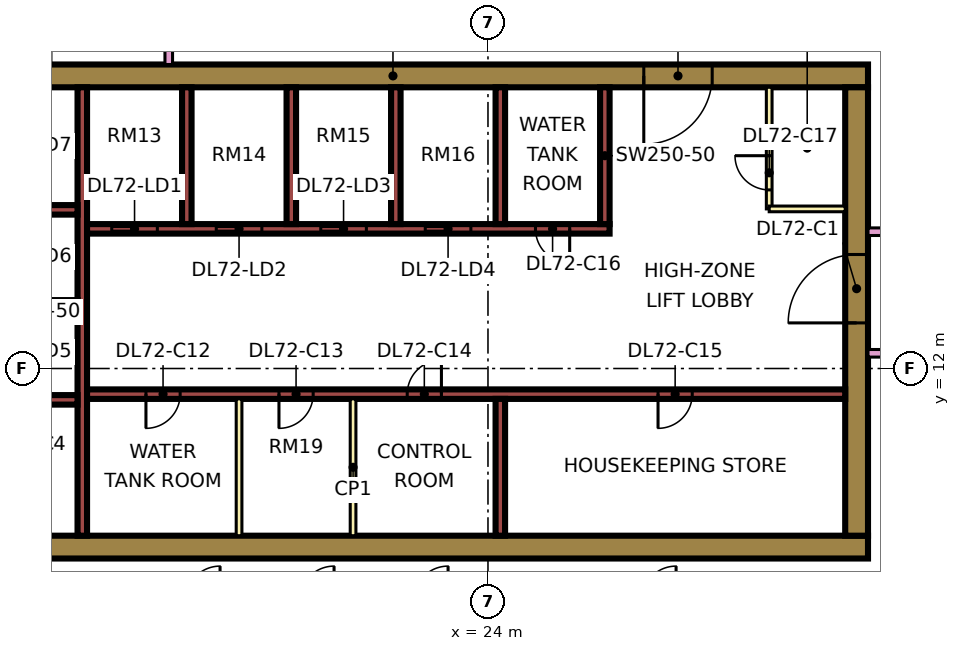
"""IFC4 building model, lengths in metres.
Left out: names, types, materials, properties, quantities, classifications, styles, units other than length and angle.
Written with IfcOpenShell. Run it as: python <this file> out.ifc"""

import sys

from ifc_helpers import new_model, si_unit, direction, frame, frame_2d, origin, place, context, subcontext, project, spatial, rectangle, extrude, element, fill, save


model = new_model("IFC4")
c1 = context("Model", 3, precision=1e-05, world=origin(), true_north=direction((0.0, 1.0)))
c2 = subcontext(c1, "Body", "Model", "MODEL_VIEW")
j1 = project(units=[si_unit("LENGTHUNIT", "METRE"), si_unit("PLANEANGLEUNIT", "RADIAN")], contexts=[c1])
p1 = place(None, origin())
s1 = spatial("IfcSite", under=j1, at=p1, CompositionType="ELEMENT")
p2 = place(p1, origin())
s2 = spatial("IfcBuilding", under=s1, at=p2, CompositionType="ELEMENT")
p3 = place(p2, frame((0.0, 0.0, 307.15)))
s3 = spatial("IfcBuildingStorey", under=s2, at=p3, CompositionType="ELEMENT", Elevation=307.15)
p4 = place(p3, frame((9.0, 7.3, 0.0), z_axis=(0.0, 0.0, 1.0), x_axis=(1.0, 0.0, 0.0)))
e1 = element("IfcWall", 1, at=p4, inside=s3, PredefinedType="SHEAR", context=c2, shape_type="SweptSolid", body=[
    extrude(rectangle(XDim=25.0, YDim=0.6, at=frame_2d((12.5, 0.0))), origin(), (0.0, 0.0, 1.0), 3.75),
])
p5 = place(p3, frame((9.0, 19.7, 0.0), z_axis=(0.0, 0.0, 1.0), x_axis=(1.0, 0.0, 0.0)))
e2 = element("IfcWall", 2, at=p5, inside=s3, PredefinedType="SHEAR", context=c2, shape_type="SweptSolid", body=[
    extrude(rectangle(XDim=25.0, YDim=0.6, at=frame_2d((12.5, 0.0))), origin(), (0.0, 0.0, 1.0), 3.75),
])
p6 = place(p5, frame((19.1, 0.0, 0.0)))
e3 = element("IfcOpeningElement", 3, at=p6, cuts=e2, PredefinedType="OPENING", context=c2, shape_type="SweptSolid", body=[
    extrude(rectangle(XDim=1.8, YDim=2.4, at=frame_2d((0.9, 1.2))), frame((0.0, 0.31, 0.0), z_axis=(0.0, -1.0, 0.0), x_axis=(1.0, 0.0, 0.0)), (0.0, 0.0, 1.0), 0.62),
])
p7 = place(p3, frame((33.7, 7.6, 0.0), z_axis=(0.0, 0.0, 1.0), x_axis=(0.0, 1.0, 0.0)))
e4 = element("IfcWall", 4, at=p7, inside=s3, PredefinedType="SHEAR", context=c2, shape_type="SweptSolid", body=[
    extrude(rectangle(XDim=11.8, YDim=0.6, at=frame_2d((5.9, 0.0))), origin(), (0.0, 0.0, 1.0), 3.75),
])
p8 = place(p7, frame((5.6, 0.0, 0.0)))
e5 = element("IfcOpeningElement", 5, at=p8, cuts=e4, PredefinedType="OPENING", context=c2, shape_type="SweptSolid", body=[
    extrude(rectangle(XDim=1.8, YDim=2.4, at=frame_2d((0.9, 1.2))), frame((0.0, 0.31, 0.0), z_axis=(0.0, -1.0, 0.0), x_axis=(1.0, 0.0, 0.0)), (0.0, 0.0, 1.0), 0.62),
])
p9 = place(p3, frame((13.325, 7.6, 0.0), z_axis=(0.0, 0.0, 1.0), x_axis=(0.0, 1.0, 0.0)))
e6 = element("IfcWall", 6, at=p9, inside=s3, PredefinedType="SHEAR", context=c2, shape_type="SweptSolid", body=[
    extrude(rectangle(XDim=11.8, YDim=0.25, at=frame_2d((5.9, 0.0))), origin(), (0.0, 0.0, 1.0), 3.75),
])
p10 = place(p3, frame((13.45, 11.325, 0.0), z_axis=(0.0, 0.0, 1.0), x_axis=(1.0, 0.0, 0.0)))
e7 = element("IfcWall", 7, at=p10, inside=s3, PredefinedType="SHEAR", context=c2, shape_type="SweptSolid", body=[
    extrude(rectangle(XDim=19.95, YDim=0.25, at=frame_2d((9.975, 0.0))), origin(), (0.0, 0.0, 1.0), 3.75),
])
p11 = place(p10, frame((1.55, 0.0, 0.0)))
e8 = element("IfcOpeningElement", 8, at=p11, cuts=e7, PredefinedType="OPENING", context=c2, shape_type="SweptSolid", body=[
    extrude(rectangle(XDim=0.9, YDim=2.1, at=frame_2d((0.45, 1.05))), frame((0.0, 0.135, 0.0), z_axis=(0.0, -1.0, 0.0), x_axis=(1.0, 0.0, 0.0)), (0.0, 0.0, 1.0), 0.27),
])
p12 = place(p10, frame((5.05, 0.0, 0.0)))
e9 = element("IfcOpeningElement", 9, at=p12, cuts=e7, PredefinedType="OPENING", context=c2, shape_type="SweptSolid", body=[
    extrude(rectangle(XDim=0.9, YDim=2.1, at=frame_2d((0.45, 1.05))), frame((0.0, 0.135, 0.0), z_axis=(0.0, -1.0, 0.0), x_axis=(1.0, 0.0, 0.0)), (0.0, 0.0, 1.0), 0.27),
])
p13 = place(p10, frame((8.425, 0.0, 0.0)))
e10 = element("IfcOpeningElement", 10, at=p13, cuts=e7, PredefinedType="OPENING", context=c2, shape_type="SweptSolid", body=[
    extrude(rectangle(XDim=0.9, YDim=2.1, at=frame_2d((0.45, 1.05))), frame((0.0, 0.135, 0.0), z_axis=(0.0, -1.0, 0.0), x_axis=(1.0, 0.0, 0.0)), (0.0, 0.0, 1.0), 0.27),
])
p14 = place(p10, frame((15.025, 0.0, 0.0)))
e11 = element("IfcOpeningElement", 11, at=p14, cuts=e7, PredefinedType="OPENING", context=c2, shape_type="SweptSolid", body=[
    extrude(rectangle(XDim=0.9, YDim=2.1, at=frame_2d((0.45, 1.05))), frame((0.0, 0.135, 0.0), z_axis=(0.0, -1.0, 0.0), x_axis=(1.0, 0.0, 0.0)), (0.0, 0.0, 1.0), 0.27),
])
p15 = place(p3, frame((13.45, 15.675, 0.0), z_axis=(0.0, 0.0, 1.0), x_axis=(1.0, 0.0, 0.0)))
e12 = element("IfcWall", 12, at=p15, inside=s3, PredefinedType="SHEAR", context=c2, shape_type="SweptSolid", body=[
    extrude(rectangle(XDim=13.75, YDim=0.25, at=frame_2d((6.875, 0.0))), origin(), (0.0, 0.0, 1.0), 3.75),
])
p16 = place(p15, frame((0.65, 0.0, 0.0)))
e13 = element("IfcOpeningElement", 13, at=p16, cuts=e12, PredefinedType="OPENING", context=c2, shape_type="SweptSolid", body=[
    extrude(rectangle(XDim=1.2, YDim=2.2, at=frame_2d((0.6, 1.1))), frame((0.0, 0.135, 0.0), z_axis=(0.0, -1.0, 0.0), x_axis=(1.0, 0.0, 0.0)), (0.0, 0.0, 1.0), 0.27),
])
p17 = place(p15, frame((3.4, 0.0, 0.0)))
e14 = element("IfcOpeningElement", 14, at=p17, cuts=e12, PredefinedType="OPENING", context=c2, shape_type="SweptSolid", body=[
    extrude(rectangle(XDim=1.2, YDim=2.2, at=frame_2d((0.6, 1.1))), frame((0.0, 0.135, 0.0), z_axis=(0.0, -1.0, 0.0), x_axis=(1.0, 0.0, 0.0)), (0.0, 0.0, 1.0), 0.27),
])
p18 = place(p15, frame((6.15, 0.0, 0.0)))
e15 = element("IfcOpeningElement", 15, at=p18, cuts=e12, PredefinedType="OPENING", context=c2, shape_type="SweptSolid", body=[
    extrude(rectangle(XDim=1.2, YDim=2.2, at=frame_2d((0.6, 1.1))), frame((0.0, 0.135, 0.0), z_axis=(0.0, -1.0, 0.0), x_axis=(1.0, 0.0, 0.0)), (0.0, 0.0, 1.0), 0.27),
])
p19 = place(p15, frame((8.9, 0.0, 0.0)))
e16 = element("IfcOpeningElement", 16, at=p19, cuts=e12, PredefinedType="OPENING", context=c2, shape_type="SweptSolid", body=[
    extrude(rectangle(XDim=1.2, YDim=2.2, at=frame_2d((0.6, 1.1))), frame((0.0, 0.135, 0.0), z_axis=(0.0, -1.0, 0.0), x_axis=(1.0, 0.0, 0.0)), (0.0, 0.0, 1.0), 0.27),
])
p20 = place(p15, frame((11.8, 0.0, 0.0)))
e17 = element("IfcOpeningElement", 17, at=p20, cuts=e12, PredefinedType="OPENING", context=c2, shape_type="SweptSolid", body=[
    extrude(rectangle(XDim=0.9, YDim=2.1, at=frame_2d((0.45, 1.05))), frame((0.0, 0.135, 0.0), z_axis=(0.0, -1.0, 0.0), x_axis=(1.0, 0.0, 0.0)), (0.0, 0.0, 1.0), 0.27),
])
for number, where, z_axis, x_axis in (
    (18, (10.2, 11.175, 0.0), (0.0, 0.0, 1.0), (1.0, 0.0, 0.0)),
    (19, (10.2, 13.675, 0.0), (0.0, 0.0, 1.0), (1.0, 0.0, 0.0)),
    (20, (10.2, 16.175, 0.0), (0.0, 0.0, 1.0), (1.0, 0.0, 0.0)),
):
    element("IfcWall", number, at=place(p3, frame(where, z_axis=z_axis, x_axis=x_axis)), inside=s3, PredefinedType="SHEAR", context=c2, shape_type="SweptSolid", body=[
        extrude(rectangle(XDim=3.0, YDim=0.25, at=frame_2d((1.5, 0.0))), origin(), (0.0, 0.0, 1.0), 3.75),
    ])
for number, where, z_axis, x_axis in (
    (21, (24.325, 7.6, 0.0), (0.0, 0.0, 1.0), (0.0, 1.0, 0.0)),
    (22, (16.075, 15.8, 0.0), (0.0, 0.0, 1.0), (0.0, 1.0, 0.0)),
    (23, (18.825, 15.8, 0.0), (0.0, 0.0, 1.0), (0.0, 1.0, 0.0)),
    (24, (21.575, 15.8, 0.0), (0.0, 0.0, 1.0), (0.0, 1.0, 0.0)),
    (25, (24.325, 15.8, 0.0), (0.0, 0.0, 1.0), (0.0, 1.0, 0.0)),
    (26, (27.075, 15.8, 0.0), (0.0, 0.0, 1.0), (0.0, 1.0, 0.0)),
):
    element("IfcWall", number, at=place(p3, frame(where, z_axis=z_axis, x_axis=x_axis)), inside=s3, PredefinedType="SHEAR", context=c2, shape_type="SweptSolid", body=[
        extrude(rectangle(XDim=3.6, YDim=0.25, at=frame_2d((1.8, 0.0))), origin(), (0.0, 0.0, 1.0), 3.75),
    ])
p21 = place(p3, frame((-1.447, 12.553, 0.0), z_axis=(0.0, 0.0, 1.0), x_axis=(0.707106781187, -0.707106781187, 0.0)))
e27 = element("IfcWall", 27, at=p21, inside=s3, PredefinedType="SOLIDWALL", context=c2, shape_type="SweptSolid", body=[
    extrude(rectangle(XDim=19.799, YDim=0.15, at=frame_2d((9.899, 0.0))), origin(), (0.0, 0.0, 1.0), 3.35),
])
p22 = place(p21, frame((2.212, 0.0, 0.45)))
e28 = element("IfcOpeningElement", 28, at=p22, cuts=e27, PredefinedType="OPENING", context=c2, shape_type="SweptSolid", body=[
    extrude(rectangle(XDim=3.0, YDim=2.4, at=frame_2d((1.5, 1.2))), frame((0.0, 0.085, 0.0), z_axis=(0.0, -1.0, 0.0), x_axis=(1.0, 0.0, 0.0)), (0.0, 0.0, 1.0), 0.17),
])
p23 = place(p21, frame((10.216, 0.0, 0.45)))
e29 = element("IfcOpeningElement", 29, at=p23, cuts=e27, PredefinedType="OPENING", context=c2, shape_type="SweptSolid", body=[
    extrude(rectangle(XDim=3.0, YDim=2.4, at=frame_2d((1.5, 1.2))), frame((0.0, 0.085, 0.0), z_axis=(0.0, -1.0, 0.0), x_axis=(1.0, 0.0, 0.0)), (0.0, 0.0, 1.0), 0.17),
])
for number, where, z_axis, x_axis in (
    (30, (17.45, 7.6, 0.0), (0.0, 0.0, 1.0), (0.0, 1.0, 0.0)),
    (31, (20.45, 7.6, 0.0), (0.0, 0.0, 1.0), (0.0, 1.0, 0.0)),
):
    element("IfcWall", number, at=place(p3, frame(where, z_axis=z_axis, x_axis=x_axis)), inside=s3, PredefinedType="PARTITIONING", context=c2, shape_type="SweptSolid", body=[
        extrude(rectangle(XDim=3.6, YDim=0.15, at=frame_2d((1.8, 0.0))), origin(), (0.0, 0.0, 1.0), 3.35),
    ])
p24 = place(p3, frame((31.4, 16.2, 0.0), z_axis=(0.0, 0.0, 1.0), x_axis=(0.0, 1.0, 0.0)))
e32 = element("IfcWall", 32, at=p24, inside=s3, PredefinedType="PARTITIONING", context=c2, shape_type="SweptSolid", body=[
    extrude(rectangle(XDim=3.2, YDim=0.15, at=frame_2d((1.6, 0.0))), origin(), (0.0, 0.0, 1.0), 3.35),
])
p25 = place(p24, frame((0.5, 0.0, 0.0)))
e33 = element("IfcOpeningElement", 33, at=p25, cuts=e32, PredefinedType="OPENING", context=c2, shape_type="SweptSolid", body=[
    extrude(rectangle(XDim=0.9, YDim=2.1, at=frame_2d((0.45, 1.05))), frame((0.0, 0.085, 0.0), z_axis=(0.0, -1.0, 0.0), x_axis=(1.0, 0.0, 0.0)), (0.0, 0.0, 1.0), 0.17),
])
p26 = place(p3, frame((31.4, 16.2, 0.0), z_axis=(0.0, 0.0, 1.0), x_axis=(1.0, 0.0, 0.0)))
e34 = element("IfcWall", 34, at=p26, inside=s3, PredefinedType="PARTITIONING", context=c2, shape_type="SweptSolid", body=[
    extrude(rectangle(XDim=2.0, YDim=0.15, at=frame_2d((1.0, 0.0))), origin(), (0.0, 0.0, 1.0), 3.35),
])
p27 = place(p3, frame((15.6, 20.0, 0.0), z_axis=(0.0, 0.0, 1.0), x_axis=(0.0, 1.0, 0.0)))
e35 = element("IfcWall", 35, at=p27, inside=s3, PredefinedType="PARTITIONING", context=c2, shape_type="SweptSolid", body=[
    extrude(rectangle(XDim=27.775, YDim=0.2, at=frame_2d((13.887, 0.0))), origin(), (0.0, 0.0, 1.0), 3.35),
])
p28 = place(p27, frame((7.0, 0.0, 0.0)))
e36 = element("IfcOpeningElement", 36, at=p28, cuts=e35, PredefinedType="OPENING", context=c2, shape_type="SweptSolid", body=[
    extrude(rectangle(XDim=1.0, YDim=2.1, at=frame_2d((0.5, 1.05))), frame((0.0, 0.11, 0.0), z_axis=(0.0, -1.0, 0.0), x_axis=(1.0, 0.0, 0.0)), (0.0, 0.0, 1.0), 0.22),
])
p29 = place(p27, frame((12.95, 0.0, 0.0)))
e37 = element("IfcOpeningElement", 37, at=p29, cuts=e35, PredefinedType="OPENING", context=c2, shape_type="SweptSolid", body=[
    extrude(rectangle(XDim=1.0, YDim=2.1, at=frame_2d((0.5, 1.05))), frame((0.0, 0.11, 0.0), z_axis=(0.0, -1.0, 0.0), x_axis=(1.0, 0.0, 0.0)), (0.0, 0.0, 1.0), 0.22),
])
p30 = place(p27, frame((16.75, 0.0, 0.0)))
e38 = element("IfcOpeningElement", 38, at=p30, cuts=e35, PredefinedType="OPENING", context=c2, shape_type="SweptSolid", body=[
    extrude(rectangle(XDim=1.0, YDim=2.1, at=frame_2d((0.5, 1.05))), frame((0.0, 0.11, 0.0), z_axis=(0.0, -1.0, 0.0), x_axis=(1.0, 0.0, 0.0)), (0.0, 0.0, 1.0), 0.22),
])
p31 = place(p27, frame((1.15, 0.0, 0.0)))
e39 = element("IfcOpeningElement", 39, at=p31, cuts=e35, PredefinedType="OPENING", context=c2, shape_type="SweptSolid", body=[
    extrude(rectangle(XDim=1.8, YDim=2.1, at=frame_2d((0.9, 1.05))), frame((0.0, 0.11, 0.0), z_axis=(0.0, -1.0, 0.0), x_axis=(1.0, 0.0, 0.0)), (0.0, 0.0, 1.0), 0.22),
])
p32 = place(p27, frame((25.9, 0.0, 0.0)))
e40 = element("IfcOpeningElement", 40, at=p32, cuts=e35, PredefinedType="OPENING", context=c2, shape_type="SweptSolid", body=[
    extrude(rectangle(XDim=1.0, YDim=2.1, at=frame_2d((0.5, 1.05))), frame((0.0, 0.11, 0.0), z_axis=(0.0, -1.0, 0.0), x_axis=(1.0, 0.0, 0.0)), (0.0, 0.0, 1.0), 0.22),
])
p33 = place(p3, frame((34.0, 12.4, 0.0), z_axis=(0.0, 0.0, 1.0), x_axis=(1.0, 0.0, 0.0)))
e41 = element("IfcWall", 41, at=p33, inside=s3, PredefinedType="PARTITIONING", context=c2, shape_type="SweptSolid", body=[
    extrude(rectangle(XDim=2.401, YDim=0.2, at=frame_2d((1.2, 0.0))), origin(), (0.0, 0.0, 1.0), 3.35),
])
p34 = place(p3, frame((34.0, 15.6, 0.0), z_axis=(0.0, 0.0, 1.0), x_axis=(1.0, 0.0, 0.0)))
e42 = element("IfcWall", 42, at=p34, inside=s3, PredefinedType="PARTITIONING", context=c2, shape_type="SweptSolid", body=[
    extrude(rectangle(XDim=10.35, YDim=0.2, at=frame_2d((5.175, 0.0))), origin(), (0.0, 0.0, 1.0), 3.35),
])
p35 = place(p34, frame((5.6, 0.0, 0.0)))
e43 = element("IfcOpeningElement", 43, at=p35, cuts=e42, PredefinedType="OPENING", context=c2, shape_type="SweptSolid", body=[
    extrude(rectangle(XDim=1.0, YDim=2.1, at=frame_2d((0.5, 1.05))), frame((0.0, 0.11, 0.0), z_axis=(0.0, -1.0, 0.0), x_axis=(1.0, 0.0, 0.0)), (0.0, 0.0, 1.0), 0.22),
])
p36 = place(p34, frame((0.45, 0.0, 0.0)))
e44 = element("IfcOpeningElement", 44, at=p36, cuts=e42, PredefinedType="OPENING", context=c2, shape_type="SweptSolid", body=[
    extrude(rectangle(XDim=1.2, YDim=2.1, at=frame_2d((0.6, 1.05))), frame((0.0, 0.11, 0.0), z_axis=(0.0, -1.0, 0.0), x_axis=(1.0, 0.0, 0.0)), (0.0, 0.0, 1.0), 0.22),
])
p37 = place(p16, origin())
e45 = element("IfcDoor", 45, at=p37, inside=s3, OperationType="DOUBLE_DOOR_SLIDING", PredefinedType="DOOR", context=c2, shape_type="SweptSolid", body=[
    extrude(rectangle(XDim=1.2, YDim=2.2, at=frame_2d((0.6, 1.1))), frame((0.0, 0.025, 0.0), z_axis=(0.0, -1.0, 0.0), x_axis=(1.0, 0.0, 0.0)), (0.0, 0.0, 1.0), 0.05),
])
fill(e13, e45)
p38 = place(p17, origin())
e46 = element("IfcDoor", 46, at=p38, inside=s3, OperationType="DOUBLE_DOOR_SLIDING", PredefinedType="DOOR", context=c2, shape_type="SweptSolid", body=[
    extrude(rectangle(XDim=1.2, YDim=2.2, at=frame_2d((0.6, 1.1))), frame((0.0, 0.025, 0.0), z_axis=(0.0, -1.0, 0.0), x_axis=(1.0, 0.0, 0.0)), (0.0, 0.0, 1.0), 0.05),
])
fill(e14, e46)
p39 = place(p18, origin())
e47 = element("IfcDoor", 47, at=p39, inside=s3, OperationType="DOUBLE_DOOR_SLIDING", PredefinedType="DOOR", context=c2, shape_type="SweptSolid", body=[
    extrude(rectangle(XDim=1.2, YDim=2.2, at=frame_2d((0.6, 1.1))), frame((0.0, 0.025, 0.0), z_axis=(0.0, -1.0, 0.0), x_axis=(1.0, 0.0, 0.0)), (0.0, 0.0, 1.0), 0.05),
])
fill(e15, e47)
p40 = place(p19, origin())
e48 = element("IfcDoor", 48, at=p40, inside=s3, OperationType="DOUBLE_DOOR_SLIDING", PredefinedType="DOOR", context=c2, shape_type="SweptSolid", body=[
    extrude(rectangle(XDim=1.2, YDim=2.2, at=frame_2d((0.6, 1.1))), frame((0.0, 0.025, 0.0), z_axis=(0.0, -1.0, 0.0), x_axis=(1.0, 0.0, 0.0)), (0.0, 0.0, 1.0), 0.05),
])
fill(e16, e48)
p41 = place(p8, origin())
e49 = element("IfcDoor", 49, at=p41, inside=s3, OperationType="DOUBLE_DOOR_SINGLE_SWING", PredefinedType="DOOR", context=c2, shape_type="SweptSolid", body=[
    extrude(rectangle(XDim=1.8, YDim=2.4, at=frame_2d((0.9, 1.2))), frame((0.0, 0.025, 0.0), z_axis=(0.0, -1.0, 0.0), x_axis=(1.0, 0.0, 0.0)), (0.0, 0.0, 1.0), 0.05),
])
fill(e5, e49)
p42 = place(p6, frame((1.8, 0.0, 0.0), z_axis=(0.0, 0.0, 1.0), x_axis=(-1.0, 0.0, 0.0)))
e50 = element("IfcDoor", 50, at=p42, inside=s3, OperationType="DOUBLE_DOOR_SINGLE_SWING", PredefinedType="DOOR", context=c2, shape_type="SweptSolid", body=[
    extrude(rectangle(XDim=1.8, YDim=2.4, at=frame_2d((0.9, 1.2))), frame((0.0, 0.025, 0.0), z_axis=(0.0, -1.0, 0.0), x_axis=(1.0, 0.0, 0.0)), (0.0, 0.0, 1.0), 0.05),
])
fill(e3, e50)
p43 = place(p11, frame((0.9, 0.0, 0.0), z_axis=(0.0, 0.0, 1.0), x_axis=(-1.0, 0.0, 0.0)))
e51 = element("IfcDoor", 51, at=p43, inside=s3, OperationType="SINGLE_SWING_LEFT", PredefinedType="DOOR", context=c2, shape_type="SweptSolid", body=[
    extrude(rectangle(XDim=0.9, YDim=2.1, at=frame_2d((0.45, 1.05))), frame((0.0, 0.025, 0.0), z_axis=(0.0, -1.0, 0.0), x_axis=(1.0, 0.0, 0.0)), (0.0, 0.0, 1.0), 0.05),
])
fill(e8, e51)
p44 = place(p12, frame((0.9, 0.0, 0.0), z_axis=(0.0, 0.0, 1.0), x_axis=(-1.0, 0.0, 0.0)))
e52 = element("IfcDoor", 52, at=p44, inside=s3, OperationType="SINGLE_SWING_LEFT", PredefinedType="DOOR", context=c2, shape_type="SweptSolid", body=[
    extrude(rectangle(XDim=0.9, YDim=2.1, at=frame_2d((0.45, 1.05))), frame((0.0, 0.025, 0.0), z_axis=(0.0, -1.0, 0.0), x_axis=(1.0, 0.0, 0.0)), (0.0, 0.0, 1.0), 0.05),
])
fill(e9, e52)
p45 = place(p13, frame((0.9, 0.0, 0.0), z_axis=(0.0, 0.0, 1.0), x_axis=(-1.0, 0.0, 0.0)))
e53 = element("IfcDoor", 53, at=p45, inside=s3, OperationType="SINGLE_SWING_RIGHT", PredefinedType="DOOR", context=c2, shape_type="SweptSolid", body=[
    extrude(rectangle(XDim=0.9, YDim=2.1, at=frame_2d((0.45, 1.05))), frame((0.0, 0.025, 0.0), z_axis=(0.0, -1.0, 0.0), x_axis=(1.0, 0.0, 0.0)), (0.0, 0.0, 1.0), 0.05),
])
fill(e10, e53)
p46 = place(p14, frame((0.9, 0.0, 0.0), z_axis=(0.0, 0.0, 1.0), x_axis=(-1.0, 0.0, 0.0)))
e54 = element("IfcDoor", 54, at=p46, inside=s3, OperationType="SINGLE_SWING_LEFT", PredefinedType="DOOR", context=c2, shape_type="SweptSolid", body=[
    extrude(rectangle(XDim=0.9, YDim=2.1, at=frame_2d((0.45, 1.05))), frame((0.0, 0.025, 0.0), z_axis=(0.0, -1.0, 0.0), x_axis=(1.0, 0.0, 0.0)), (0.0, 0.0, 1.0), 0.05),
])
fill(e11, e54)
p47 = place(p20, origin())
e55 = element("IfcDoor", 55, at=p47, inside=s3, OperationType="SINGLE_SWING_RIGHT", PredefinedType="DOOR", context=c2, shape_type="SweptSolid", body=[
    extrude(rectangle(XDim=0.9, YDim=2.1, at=frame_2d((0.45, 1.05))), frame((0.0, 0.025, 0.0), z_axis=(0.0, -1.0, 0.0), x_axis=(1.0, 0.0, 0.0)), (0.0, 0.0, 1.0), 0.05),
])
fill(e17, e55)
p48 = place(p25, frame((0.9, 0.0, 0.0), z_axis=(0.0, 0.0, 1.0), x_axis=(-1.0, 0.0, 0.0)))
e56 = element("IfcDoor", 56, at=p48, inside=s3, OperationType="SINGLE_SWING_RIGHT", PredefinedType="DOOR", context=c2, shape_type="SweptSolid", body=[
    extrude(rectangle(XDim=0.9, YDim=2.1, at=frame_2d((0.45, 1.05))), frame((0.0, 0.025, 0.0), z_axis=(0.0, -1.0, 0.0), x_axis=(1.0, 0.0, 0.0)), (0.0, 0.0, 1.0), 0.05),
])
fill(e33, e56)
save(model, sys.argv[1])
